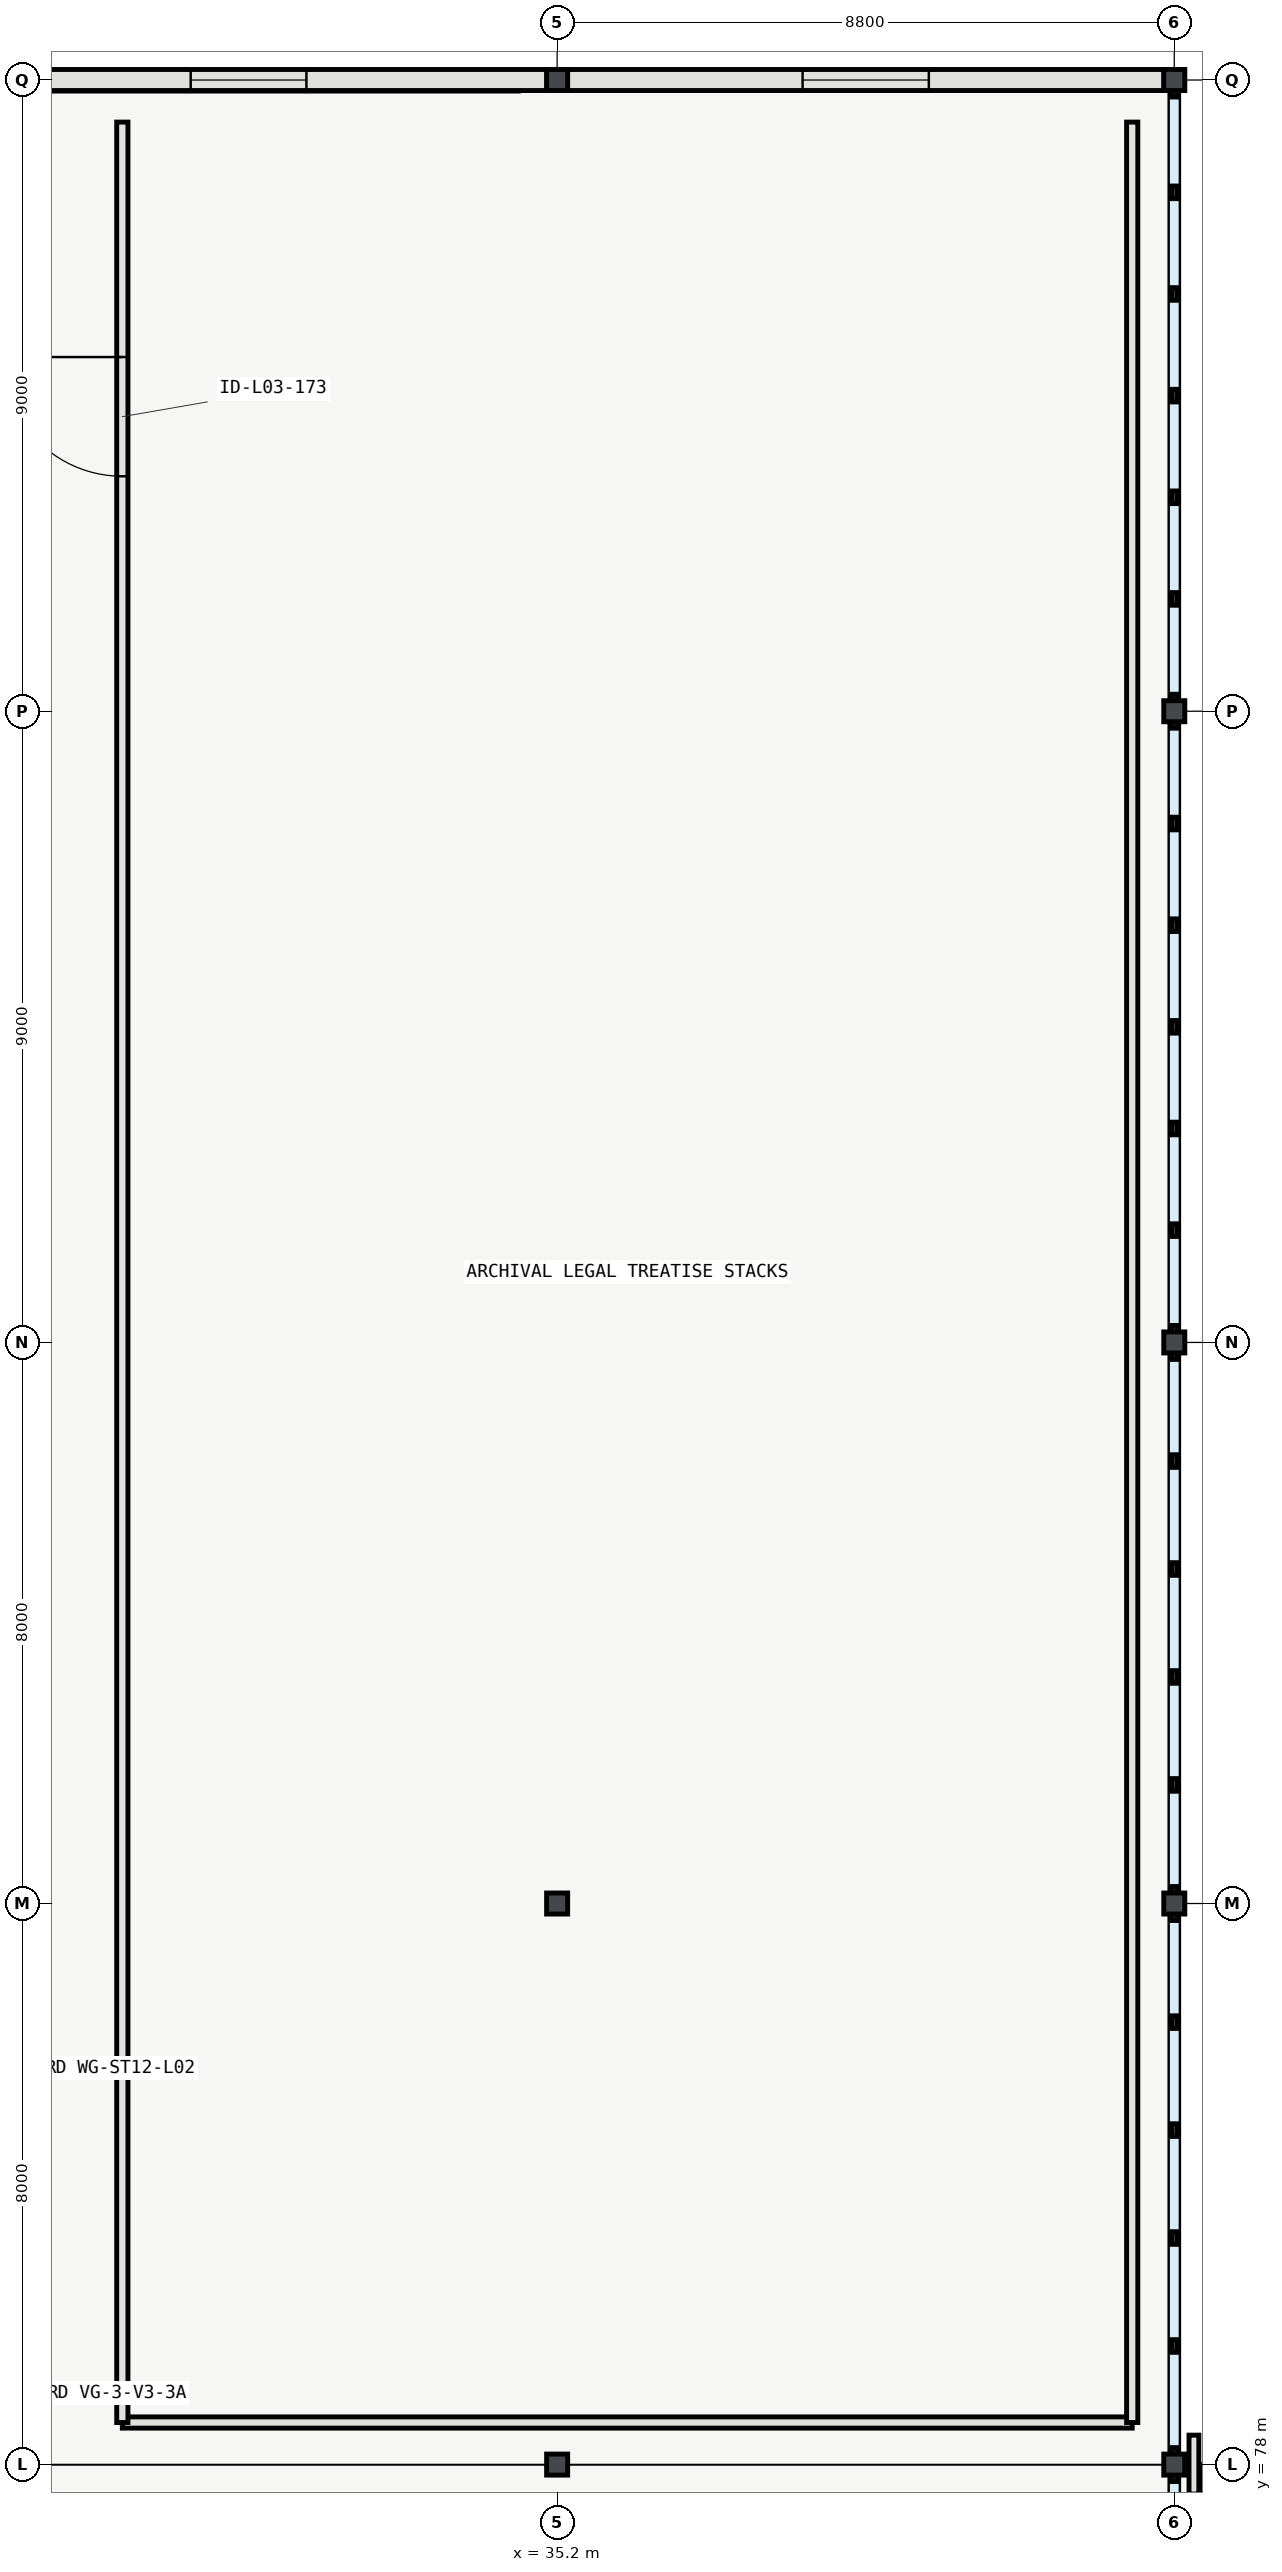
"""IFC4 building model, lengths in metres.
Left out: names, types, materials, properties, quantities, classifications, styles, units other than length and angle.
Written with IfcOpenShell. Run it as: python <this file> out.ifc"""

import sys

from ifc_helpers import new_model, si_unit, direction, frame, frame_2d, origin, origin_2d, place, context, subcontext, project, spatial, rectangle, i_section, extrude, element, fill, save


model = new_model("IFC4")
c1 = context("Model", 3, precision=1e-05, world=origin(), true_north=direction((0.0, 1.0)))
c2 = subcontext(c1, "Body", "Model", "MODEL_VIEW")
j1 = project(units=[si_unit("LENGTHUNIT", "METRE"), si_unit("PLANEANGLEUNIT", "RADIAN")], contexts=[c1])
p1 = place(None, origin())
s1 = spatial("IfcSite", under=j1, at=p1, CompositionType="ELEMENT")
p2 = place(p1, origin())
s2 = spatial("IfcBuilding", under=s1, at=p2, CompositionType="ELEMENT")
p3 = place(p2, frame((0.0, 0.0, 16.2)))
s3 = spatial("IfcBuildingStorey", under=s2, at=p3, CompositionType="ELEMENT", Elevation=16.2)
for number, where, z_axis, x_axis in (
    (1, (35.2, 78.0, 0.0), (0.0, 0.0, 1.0), (1.0, 0.0, 0.0)),
    (2, (35.2, 86.0, 0.0), (0.0, 0.0, 1.0), (1.0, 0.0, 0.0)),
    (3, (35.2, 112.0, 0.0), (0.0, 0.0, 1.0), (1.0, 0.0, 0.0)),
    (4, (44.0, 78.0, 0.0), (0.0, 0.0, 1.0), (1.0, 0.0, 0.0)),
    (5, (44.0, 86.0, 0.0), (0.0, 0.0, 1.0), (1.0, 0.0, 0.0)),
    (6, (44.0, 94.0, 0.0), (0.0, 0.0, 1.0), (1.0, 0.0, 0.0)),
    (7, (44.0, 103.0, 0.0), (0.0, 0.0, 1.0), (1.0, 0.0, 0.0)),
    (8, (44.0, 112.0, 0.0), (0.0, 0.0, 1.0), (1.0, 0.0, 0.0)),
):
    element("IfcColumn", number, at=place(p3, frame(where, z_axis=z_axis, x_axis=x_axis)), inside=s3, PredefinedType="COLUMN", context=c2, shape_type="SweptSolid", body=[
        extrude(i_section(OverallWidth=0.3, OverallDepth=0.3, WebThickness=0.01, FlangeThickness=0.015, FilletRadius=0.018, at=origin_2d()), origin(), (0.0, 0.0, 1.0), 4.2),
    ])
p4 = place(p3, frame((35.054, 112.0, 0.0), z_axis=(0.0, 0.0, 1.0), x_axis=(-1.0, 0.0, 0.0)))
e9 = element("IfcWall", 9, at=p4, inside=s3, PredefinedType="SOLIDWALL", context=c2, shape_type="SweptSolid", body=[
    extrude(rectangle(XDim=8.508, YDim=0.3, at=frame_2d((4.254, 0.0))), origin(), (0.0, 0.0, 1.0), 3.603),
])
p5 = place(p4, frame((3.429, 0.0, 0.95)))
e10 = element("IfcOpeningElement", 10, at=p5, cuts=e9, PredefinedType="OPENING", context=c2, shape_type="SweptSolid", body=[
    extrude(rectangle(XDim=1.65, YDim=2.1, at=frame_2d((0.825, 1.05))), frame((0.0, 0.16, 0.0), z_axis=(0.0, -1.0, 0.0), x_axis=(1.0, 0.0, 0.0)), (0.0, 0.0, 1.0), 0.32),
])
p6 = place(p3, frame((43.854, 112.0, 0.0), z_axis=(0.0, 0.0, 1.0), x_axis=(-1.0, 0.0, 0.0)))
e11 = element("IfcWall", 11, at=p6, inside=s3, PredefinedType="SOLIDWALL", context=c2, shape_type="SweptSolid", body=[
    extrude(rectangle(XDim=8.508, YDim=0.3, at=frame_2d((4.254, 0.0))), origin(), (0.0, 0.0, 1.0), 3.603),
])
p7 = place(p6, frame((3.354, 0.0, 0.95)))
e12 = element("IfcOpeningElement", 12, at=p7, cuts=e11, PredefinedType="OPENING", context=c2, shape_type="SweptSolid", body=[
    extrude(rectangle(XDim=1.8, YDim=2.1, at=frame_2d((0.9, 1.05))), frame((0.0, 0.16, 0.0), z_axis=(0.0, -1.0, 0.0), x_axis=(1.0, 0.0, 0.0)), (0.0, 0.0, 1.0), 0.32),
])
p8 = place(p3, frame((44.44, 30.0, 0.0), z_axis=(0.0, 0.0, 1.0), x_axis=(0.0, 1.0, 0.0)))
e13 = element("IfcWall", 13, at=p8, inside=s3, PredefinedType="SOLIDWALL", context=c2, shape_type="SweptSolid", body=[
    extrude(rectangle(XDim=48.0, YDim=0.16, at=frame_2d((24.0, 0.0))), origin(), (0.0, 0.0, 1.0), 0.58),
])
p9 = place(p3, frame((44.28, 77.58, 0.0), z_axis=(0.0, 0.0, 1.0), x_axis=(0.0, 1.0, 0.0)))
e14 = element("IfcWall", 14, at=p9, inside=s3, PredefinedType="SOLIDWALL", context=c2, shape_type="SweptSolid", body=[
    extrude(rectangle(XDim=0.84, YDim=0.14, at=frame_2d((0.42, 0.0))), origin(), (0.0, 0.0, 1.0), 3.94),
])
p10 = place(p3, frame((29.0, 78.6, 0.0), z_axis=(0.0, 0.0, 1.0), x_axis=(1.0, 0.0, 0.0)))
e15 = element("IfcWall", 15, at=p10, inside=s3, PredefinedType="PARTITIONING", context=c2, shape_type="SweptSolid", body=[
    extrude(rectangle(XDim=14.4, YDim=0.16, at=frame_2d((7.2, 0.0))), origin(), (0.0, 0.0, 1.0), 3.92),
])
p11 = place(p3, frame((29.0, 111.4, 0.0), z_axis=(0.0, 0.0, 1.0), x_axis=(0.0, -1.0, 0.0)))
e16 = element("IfcWall", 16, at=p11, inside=s3, PredefinedType="PARTITIONING", context=c2, shape_type="SweptSolid", body=[
    extrude(rectangle(XDim=32.8, YDim=0.16, at=frame_2d((16.4, 0.0))), origin(), (0.0, 0.0, 1.0), 3.92),
])
p12 = place(p11, frame((3.35, 0.0, 0.0)))
e17 = element("IfcOpeningElement", 17, at=p12, cuts=e16, PredefinedType="OPENING", context=c2, shape_type="SweptSolid", body=[
    extrude(rectangle(XDim=1.7, YDim=2.3, at=frame_2d((0.85, 1.15))), frame((0.0, 0.09, 0.0), z_axis=(0.0, -1.0, 0.0), x_axis=(1.0, 0.0, 0.0)), (0.0, 0.0, 1.0), 0.18),
])
p13 = place(p3, frame((43.4, 78.6, 0.0), z_axis=(0.0, 0.0, 1.0), x_axis=(0.0, 1.0, 0.0)))
e18 = element("IfcWall", 18, at=p13, inside=s3, PredefinedType="PARTITIONING", context=c2, shape_type="SweptSolid", body=[
    extrude(rectangle(XDim=32.8, YDim=0.16, at=frame_2d((16.4, 0.0))), origin(), (0.0, 0.0, 1.0), 3.92),
])
p14 = place(p5, origin())
e19 = element("IfcWindow", 19, at=p14, inside=s3, PartitioningType="SINGLE_PANEL", PredefinedType="WINDOW", context=c2, shape_type="SweptSolid", body=[
    extrude(rectangle(XDim=1.65, YDim=2.1, at=frame_2d((0.825, 1.05))), frame((0.0, 0.03, 0.0), z_axis=(0.0, -1.0, 0.0), x_axis=(1.0, 0.0, 0.0)), (0.0, 0.0, 1.0), 0.06),
])
fill(e10, e19)
p15 = place(p7, origin())
e20 = element("IfcWindow", 20, at=p15, inside=s3, PartitioningType="SINGLE_PANEL", PredefinedType="WINDOW", context=c2, shape_type="SweptSolid", body=[
    extrude(rectangle(XDim=1.8, YDim=2.1, at=frame_2d((0.9, 1.05))), frame((0.0, 0.03, 0.0), z_axis=(0.0, -1.0, 0.0), x_axis=(1.0, 0.0, 0.0)), (0.0, 0.0, 1.0), 0.06),
])
fill(e12, e20)
p16 = place(p12, origin())
e21 = element("IfcDoor", 21, at=p16, inside=s3, OperationType="DOUBLE_DOOR_SINGLE_SWING", PredefinedType="DOOR", context=c2, shape_type="SweptSolid", body=[
    extrude(rectangle(XDim=1.7, YDim=2.3, at=frame_2d((0.85, 1.15))), frame((0.0, 0.025, 0.0), z_axis=(0.0, -1.0, 0.0), x_axis=(1.0, 0.0, 0.0)), (0.0, 0.0, 1.0), 0.05),
])
fill(e17, e21)
save(model, sys.argv[1])
